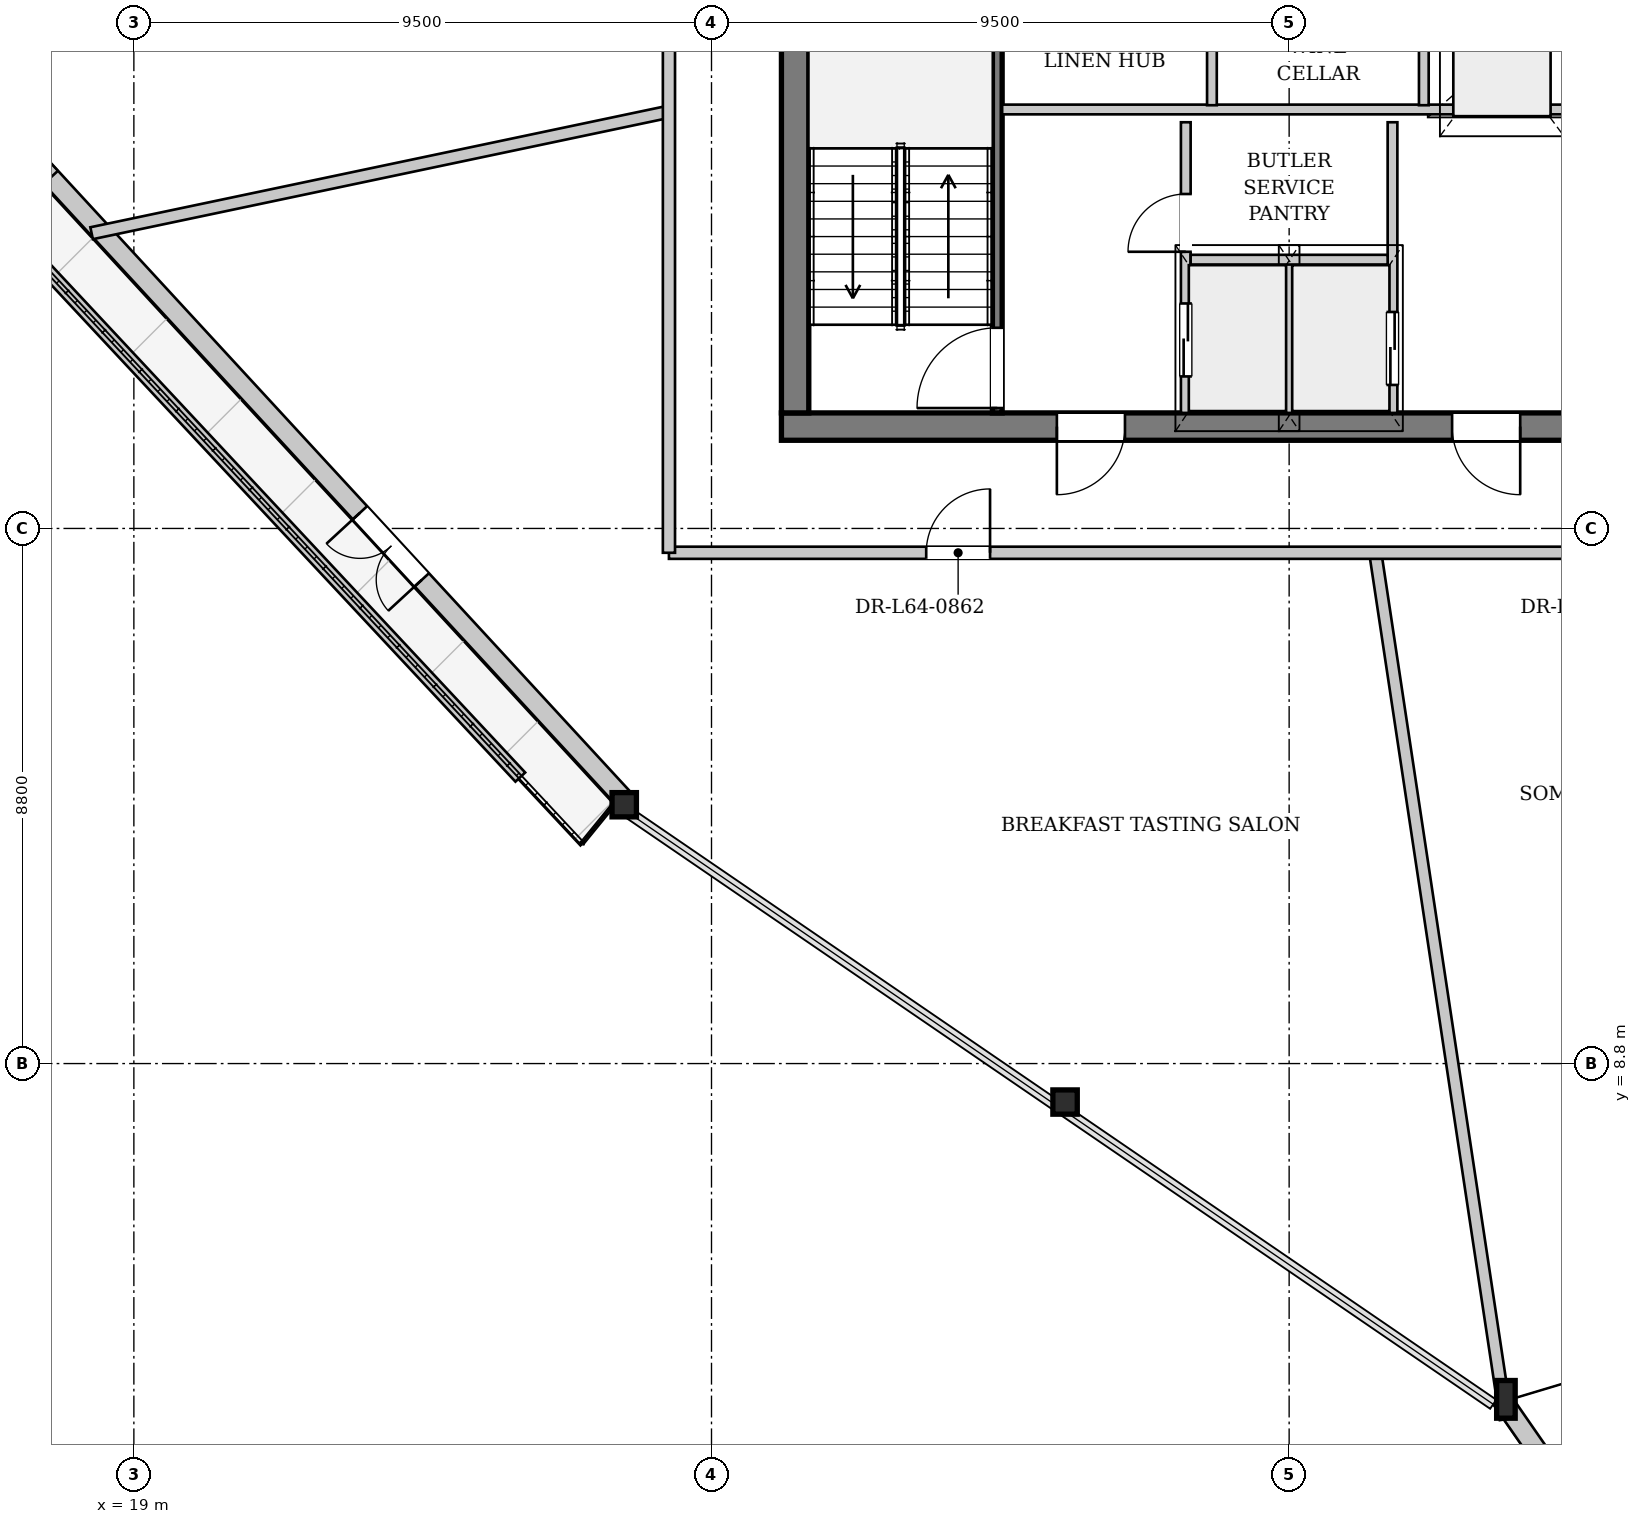
"""IFC4 building model, lengths in metres.
Left out: names, types, materials, properties, quantities, classifications, styles, units other than length and angle.
Written with IfcOpenShell. Run it as: python <this file> out.ifc"""

import sys

from ifc_helpers import new_model, si_unit, direction, frame, frame_2d, origin, origin_2d, place, context, subcontext, project, spatial, rectangle, i_section, extrude, source, transform, mapped, element, fill, save


model = new_model("IFC4")
c1 = context("Model", 3, precision=1e-05, world=origin(), true_north=direction((0.0, 1.0)))
c2 = subcontext(c1, "Body", "Model", "MODEL_VIEW")
j1 = project(units=[si_unit("LENGTHUNIT", "METRE"), si_unit("PLANEANGLEUNIT", "RADIAN")], contexts=[c1])
p1 = place(None, origin())
s1 = spatial("IfcSite", under=j1, at=p1, CompositionType="ELEMENT")
p2 = place(p1, origin())
s2 = spatial("IfcBuilding", under=s1, at=p2, CompositionType="ELEMENT")
p3 = place(p2, frame((0.0, 0.0, 241.7)))
s3 = spatial("IfcBuildingStorey", under=s2, at=p3, CompositionType="ELEMENT", Elevation=241.7)
m1 = source(origin(), c2, "Body", "SweptSolid", [
    extrude(i_section(OverallWidth=0.401, OverallDepth=0.399, WebThickness=0.022, FlangeThickness=0.034, at=origin_2d()), origin(), (0.0, 0.0, 1.0), 3.45),
])
p4 = place(p3, frame((26.906, 13.079, 0.0), z_axis=(0.09164447081, -0.01316283519, 0.99570479096), x_axis=(0.142170385525, 0.989842200292, 0.0)))
e1 = element("IfcColumn", 1, at=p4, inside=s3, PredefinedType="COLUMN", context=c2, shape_type="MappedRepresentation", body=[
    mapped(m1, transform((0.0, 0.0, 0.0), x_axis=(1.0, 0.0, 0.0), y_axis=(0.0, 1.0, 0.0), z_axis=(0.0, 0.0, 1.0), scale=1.0)),
])
m2 = source(origin(), c2, "Body", "SweptSolid", [
    extrude(i_section(OverallWidth=0.401, OverallDepth=0.399, WebThickness=0.022, FlangeThickness=0.034, at=origin_2d()), origin(), (0.0, 0.0, 1.0), 3.455),
])
p5 = place(p3, frame((34.132, 8.138, 0.0), z_axis=(0.106064205529, 0.016676317458, 0.994219434904), x_axis=(-0.155320411925, 0.987864145336, 0.0)))
e2 = element("IfcColumn", 2, at=p5, inside=s3, PredefinedType="COLUMN", context=c2, shape_type="MappedRepresentation", body=[
    mapped(m2, transform((0.0, 0.0, 0.0), x_axis=(1.0, 0.0, 0.0), y_axis=(0.0, 1.0, 0.0), z_axis=(0.0, 0.0, 1.0), scale=1.0)),
])
m3 = source(origin(), c2, "Body", "SweptSolid", [
    extrude(i_section(OverallWidth=0.305, OverallDepth=0.62, WebThickness=0.021, FlangeThickness=0.04, at=origin_2d()), origin(), (0.0, 0.0, 1.0), 3.464),
])
p6 = place(p3, frame((41.357, 3.198, 0.0), z_axis=(0.120378309465, 0.046445729472, 0.991640991904), x_axis=(-0.359967164557, 0.932964972783, 0.0)))
e3 = element("IfcColumn", 3, at=p6, inside=s3, PredefinedType="COLUMN", context=c2, shape_type="MappedRepresentation", body=[
    mapped(m3, transform((0.0, 0.0, 0.0), x_axis=(1.0, 0.0, 0.0), y_axis=(0.0, 1.0, 0.0), z_axis=(0.0, 0.0, 1.0), scale=1.0)),
])
p7 = place(p3, frame((42.896, 1.258, 0.0), z_axis=(0.0, 0.0, 1.0), x_axis=(-0.569903262384, 0.821711793467, 0.0)))
e4 = element("IfcWall", 4, at=p7, inside=s3, PredefinedType="SOLIDWALL", context=c2, shape_type="SweptSolid", body=[
    extrude(rectangle(XDim=2.471, YDim=0.32, at=frame_2d((1.236, 0.0))), origin(), (0.0, 0.0, 1.0), 2.872),
])
p8 = place(p3, frame((27.024, 13.188, 0.0), z_axis=(0.0, 0.0, 1.0), x_axis=(-0.677764411213, 0.735279132638, 0.0)))
e5 = element("IfcWall", 5, at=p8, inside=s3, PredefinedType="SOLIDWALL", context=c2, shape_type="SweptSolid", body=[
    extrude(rectangle(XDim=17.506, YDim=0.32, at=frame_2d((8.753, 0.0))), origin(), (0.0, 0.0, 1.0), 2.872),
])
p9 = place(p8, frame((4.852, 0.0, 0.0)))
e6 = element("IfcOpeningElement", 6, at=p9, cuts=e5, PredefinedType="OPENING", context=c2, shape_type="SweptSolid", body=[
    extrude(rectangle(XDim=1.5, YDim=2.3, at=frame_2d((0.75, 1.15))), frame((0.0, 0.17, 0.0), z_axis=(0.0, -1.0, 0.0), x_axis=(1.0, 0.0, 0.0)), (0.0, 0.0, 1.0), 0.34),
])
p10 = place(p8, frame((13.854, 0.0, 0.402)))
e7 = element("IfcOpeningElement", 7, at=p10, cuts=e5, PredefinedType="OPENING", context=c2, shape_type="SweptSolid", body=[
    extrude(rectangle(XDim=2.6, YDim=2.35, at=frame_2d((1.3, 1.175))), frame((0.0, 0.17, 0.0), z_axis=(0.0, -1.0, 0.0), x_axis=(1.0, 0.0, 0.0)), (0.0, 0.0, 1.0), 0.34),
])
p11 = place(p3, frame((14.681, 24.936, 0.0), z_axis=(0.0, 0.0, 1.0), x_axis=(0.682707047276, -0.730692197577, 0.0)))
e8 = element("IfcWall", 8, at=p11, inside=s3, PredefinedType="PARAPET", context=c2, shape_type="SweptSolid", body=[
    extrude(rectangle(XDim=15.635, YDim=0.22, at=frame_2d((7.817, 0.0))), origin(), (0.0, 0.0, 1.0), 0.3),
])
p12 = place(p3, frame((46.35, 19.275, 0.0), z_axis=(0.0, 0.0, 1.0), x_axis=(-1.0, 0.0, 0.0)))
e9 = element("IfcWall", 9, at=p12, inside=s3, PredefinedType="SHEAR", context=c2, shape_type="SweptSolid", body=[
    extrude(rectangle(XDim=16.7, YDim=0.45, at=frame_2d((8.35, 0.0))), origin(), (0.0, 0.0, 1.0), 3.38),
])
p13 = place(p12, frame((4.55, 0.0, 0.0)))
e10 = element("IfcOpeningElement", 10, at=p13, cuts=e9, PredefinedType="OPENING", context=c2, shape_type="SweptSolid", body=[
    extrude(rectangle(XDim=1.12, YDim=2.25, at=frame_2d((0.56, 1.125))), frame((0.0, 0.235, 0.0), z_axis=(0.0, -1.0, 0.0), x_axis=(1.0, 0.0, 0.0)), (0.0, 0.0, 1.0), 0.47),
])
p14 = place(p12, frame((11.05, 0.0, 0.0)))
e11 = element("IfcOpeningElement", 11, at=p14, cuts=e9, PredefinedType="OPENING", context=c2, shape_type="SweptSolid", body=[
    extrude(rectangle(XDim=1.12, YDim=2.25, at=frame_2d((0.56, 1.125))), frame((0.0, 0.235, 0.0), z_axis=(0.0, -1.0, 0.0), x_axis=(1.0, 0.0, 0.0)), (0.0, 0.0, 1.0), 0.47),
])
p15 = place(p3, frame((29.875, 19.5, 0.0), z_axis=(0.0, 0.0, 1.0), x_axis=(0.0, 1.0, 0.0)))
e12 = element("IfcWall", 12, at=p15, inside=s3, PredefinedType="SHEAR", context=c2, shape_type="SweptSolid", body=[
    extrude(rectangle(XDim=14.2, YDim=0.45, at=frame_2d((7.1, 0.0))), origin(), (0.0, 0.0, 1.0), 3.38),
])
p16 = place(p15, frame((7.42, 0.0, 0.0)))
e13 = element("IfcOpeningElement", 13, at=p16, cuts=e12, PredefinedType="OPENING", context=c2, shape_type="SweptSolid", body=[
    extrude(rectangle(XDim=1.6, YDim=2.2, at=frame_2d((0.8, 1.1))), frame((0.0, 0.235, 0.0), z_axis=(0.0, -1.0, 0.0), x_axis=(1.0, 0.0, 0.0)), (0.0, 0.0, 1.0), 0.47),
])
p17 = place(p3, frame((33.2, 19.5, 0.0), z_axis=(0.0, 0.0, 1.0), x_axis=(0.0, 1.0, 0.0)))
e14 = element("IfcWall", 14, at=p17, inside=s3, PredefinedType="PARTITIONING", context=c2, shape_type="SweptSolid", body=[
    extrude(rectangle(XDim=7.46, YDim=0.16, at=frame_2d((3.73, 0.0))), origin(), (0.0, 0.0, 1.0), 3.38),
])
p18 = place(p17, frame((0.08, 0.0, 0.0)))
e15 = element("IfcOpeningElement", 15, at=p18, cuts=e14, PredefinedType="OPENING", context=c2, shape_type="SweptSolid", body=[
    extrude(rectangle(XDim=1.32, YDim=2.2, at=frame_2d((0.66, 1.1))), frame((0.0, 0.09, 0.0), z_axis=(0.0, -1.0, 0.0), x_axis=(1.0, 0.0, 0.0)), (0.0, 0.0, 1.0), 0.18),
])
p19 = place(p3, frame((36.3, 19.5, 0.0), z_axis=(0.0, 0.0, 1.0), x_axis=(0.0, 1.0, 0.0)))
e16 = element("IfcWall", 16, at=p19, inside=s3, PredefinedType="PARTITIONING", context=c2, shape_type="SweptSolid", body=[
    extrude(rectangle(XDim=4.78, YDim=0.16, at=frame_2d((2.39, 0.0))), origin(), (0.0, 0.0, 1.0), 3.38),
])
p20 = place(p19, frame((0.6, 0.0, 0.0)))
e17 = element("IfcOpeningElement", 17, at=p20, cuts=e16, PredefinedType="OPENING", context=c2, shape_type="SweptSolid", body=[
    extrude(rectangle(XDim=1.2, YDim=2.2, at=frame_2d((0.6, 1.1))), frame((0.0, 0.09, 0.0), z_axis=(0.0, -1.0, 0.0), x_axis=(1.0, 0.0, 0.0)), (0.0, 0.0, 1.0), 0.18),
])
p21 = place(p19, frame((2.65, 0.0, 0.0)))
e18 = element("IfcOpeningElement", 18, at=p21, cuts=e16, PredefinedType="OPENING", context=c2, shape_type="SweptSolid", body=[
    extrude(rectangle(XDim=0.95, YDim=2.1, at=frame_2d((0.475, 1.05))), frame((0.0, 0.09, 0.0), z_axis=(0.0, -1.0, 0.0), x_axis=(1.0, 0.0, 0.0)), (0.0, 0.0, 1.0), 0.18),
])
p22 = place(p3, frame((39.7, 24.28, 0.0), z_axis=(0.0, 0.0, 1.0), x_axis=(0.0, -1.0, 0.0)))
e19 = element("IfcWall", 19, at=p22, inside=s3, PredefinedType="PARTITIONING", context=c2, shape_type="SweptSolid", body=[
    extrude(rectangle(XDim=4.78, YDim=0.16, at=frame_2d((2.39, 0.0))), origin(), (0.0, 0.0, 1.0), 3.38),
])
p23 = place(p22, frame((3.12, 0.0, 0.0)))
e20 = element("IfcOpeningElement", 20, at=p23, cuts=e19, PredefinedType="OPENING", context=c2, shape_type="SweptSolid", body=[
    extrude(rectangle(XDim=1.2, YDim=2.2, at=frame_2d((0.6, 1.1))), frame((0.0, 0.09, 0.0), z_axis=(0.0, -1.0, 0.0), x_axis=(1.0, 0.0, 0.0)), (0.0, 0.0, 1.0), 0.18),
])
p24 = place(p3, frame((38.0, 19.5, 0.0), z_axis=(0.0, 0.0, 1.0), x_axis=(0.0, 1.0, 0.0)))
e21 = element("IfcWall", 21, at=p24, inside=s3, PredefinedType="PARTITIONING", context=c2, shape_type="SweptSolid", body=[
    extrude(rectangle(XDim=2.46, YDim=0.125, at=frame_2d((1.23, 0.0))), origin(), (0.0, 0.0, 1.0), 3.38),
])
p25 = place(p3, frame((36.38, 22.02, 0.0), z_axis=(0.0, 0.0, 1.0), x_axis=(1.0, 0.0, 0.0)))
e22 = element("IfcWall", 22, at=p25, inside=s3, PredefinedType="PARTITIONING", context=c2, shape_type="SweptSolid", body=[
    extrude(rectangle(XDim=3.24, YDim=0.16, at=frame_2d((1.62, 0.0))), origin(), (0.0, 0.0, 1.0), 3.38),
])
p26 = place(p3, frame((33.28, 24.49, 0.0), z_axis=(0.0, 0.0, 1.0), x_axis=(1.0, 0.0, 0.0)))
e23 = element("IfcWall", 23, at=p26, inside=s3, PredefinedType="PARTITIONING", context=c2, shape_type="SweptSolid", body=[
    extrude(rectangle(XDim=9.44, YDim=0.16, at=frame_2d((4.72, 0.0))), origin(), (0.0, 0.0, 1.0), 3.38),
])
for number, where, z_axis, x_axis in (
    (24, (36.73, 24.56, 0.0), (0.0, 0.0, 1.0), (0.0, 1.0, 0.0)),
    (25, (40.215, 24.56, 0.0), (0.0, 0.0, 1.0), (0.0, 1.0, 0.0)),
):
    element("IfcWall", number, at=place(p3, frame(where, z_axis=z_axis, x_axis=x_axis)), inside=s3, PredefinedType="PARTITIONING", context=c2, shape_type="SweptSolid", body=[
        extrude(rectangle(XDim=2.31, YDim=0.16, at=frame_2d((1.155, 0.0))), origin(), (0.0, 0.0, 1.0), 3.38),
    ])
p27 = place(p3, frame((27.8, 24.453, 0.0), z_axis=(0.0, 0.0, 1.0), x_axis=(-0.978564998711, -0.205938202619, 0.0)))
e26 = element("IfcWall", 26, at=p27, inside=s3, PredefinedType="PARTITIONING", context=c2, shape_type="SweptSolid", body=[
    extrude(rectangle(XDim=9.703, YDim=0.2, at=frame_2d((4.852, 0.0))), origin(), (0.0, 0.0, 1.0), 3.38),
])
p28 = place(p3, frame((39.417, 17.2, 0.0), z_axis=(0.0, 0.0, 1.0), x_axis=(0.149026402879, -0.988833217102, 0.0)))
e27 = element("IfcWall", 27, at=p28, inside=s3, PredefinedType="PARTITIONING", context=c2, shape_type="SweptSolid", body=[
    extrude(rectangle(XDim=14.41, YDim=0.2, at=frame_2d((7.205, 0.0))), origin(), (0.0, 0.0, 1.0), 3.38),
])
p29 = place(p3, frame((27.8, 17.2, 0.0), z_axis=(0.0, 0.0, 1.0), x_axis=(1.0, 0.0, 0.0)))
e28 = element("IfcWall", 28, at=p29, inside=s3, PredefinedType="PARTITIONING", context=c2, shape_type="SweptSolid", body=[
    extrude(rectangle(XDim=20.4, YDim=0.2, at=frame_2d((10.2, 0.0))), origin(), (0.0, 0.0, 1.0), 3.38),
])
p30 = place(p29, frame((4.231, 0.0, 0.0)))
e29 = element("IfcOpeningElement", 29, at=p30, cuts=e28, PredefinedType="OPENING", context=c2, shape_type="SweptSolid", body=[
    extrude(rectangle(XDim=1.05, YDim=2.2, at=frame_2d((0.525, 1.1))), frame((0.0, 0.11, 0.0), z_axis=(0.0, -1.0, 0.0), x_axis=(1.0, 0.0, 0.0)), (0.0, 0.0, 1.0), 0.22),
])
p31 = place(p29, frame((15.174, 0.0, 0.0)))
e30 = element("IfcOpeningElement", 30, at=p31, cuts=e28, PredefinedType="OPENING", context=c2, shape_type="SweptSolid", body=[
    extrude(rectangle(XDim=1.05, YDim=2.2, at=frame_2d((0.525, 1.1))), frame((0.0, 0.11, 0.0), z_axis=(0.0, -1.0, 0.0), x_axis=(1.0, 0.0, 0.0)), (0.0, 0.0, 1.0), 0.22),
])
p32 = place(p3, frame((27.8, 17.2, 0.0), z_axis=(0.0, 0.0, 1.0), x_axis=(0.0, 1.0, 0.0)))
e31 = element("IfcWall", 31, at=p32, inside=s3, PredefinedType="PARTITIONING", context=c2, shape_type="SweptSolid", body=[
    extrude(rectangle(XDim=18.8, YDim=0.2, at=frame_2d((9.4, 0.0))), origin(), (0.0, 0.0, 1.0), 3.38),
])
m4 = source(origin(), c2, "Body", "SweptSolid", [
    extrude(rectangle(XDim=1.5, YDim=2.3, at=frame_2d((0.75, 1.15))), frame((0.0, 0.025, 0.0), z_axis=(0.0, -1.0, 0.0), x_axis=(1.0, 0.0, 0.0)), (0.0, 0.0, 1.0), 0.05),
])
p33 = place(p9, origin())
e32 = element("IfcDoor", 32, at=p33, inside=s3, OperationType="DOUBLE_DOOR_SINGLE_SWING", PredefinedType="DOOR", context=c2, shape_type="MappedRepresentation", body=[
    mapped(m4, transform((0.0, 0.0, 0.0), x_axis=(1.0, 0.0, 0.0), y_axis=(0.0, 1.0, 0.0), z_axis=(0.0, 0.0, 1.0), scale=1.0)),
])
fill(e6, e32)
m5 = source(origin(), c2, "Body", "SweptSolid", [
    extrude(rectangle(XDim=1.12, YDim=2.25, at=frame_2d((0.56, 1.125))), frame((0.0, 0.025, 0.0), z_axis=(0.0, -1.0, 0.0), x_axis=(1.0, 0.0, 0.0)), (0.0, 0.0, 1.0), 0.05),
])
p34 = place(p13, origin())
e33 = element("IfcDoor", 33, at=p34, inside=s3, OperationType="SINGLE_SWING_LEFT", PredefinedType="DOOR", context=c2, shape_type="MappedRepresentation", body=[
    mapped(m5, transform((0.0, 0.0, 0.0), x_axis=(1.0, 0.0, 0.0), y_axis=(0.0, 1.0, 0.0), z_axis=(0.0, 0.0, 1.0), scale=1.0)),
])
fill(e10, e33)
p35 = place(p14, origin())
e34 = element("IfcDoor", 34, at=p35, inside=s3, OperationType="SINGLE_SWING_RIGHT", PredefinedType="DOOR", context=c2, shape_type="MappedRepresentation", body=[
    mapped(m5, transform((0.0, 0.0, 0.0), x_axis=(1.0, 0.0, 0.0), y_axis=(0.0, 1.0, 0.0), z_axis=(0.0, 0.0, 1.0), scale=1.0)),
])
fill(e11, e34)
m6 = source(origin(), c2, "Body", "SweptSolid", [
    extrude(rectangle(XDim=1.32, YDim=2.2, at=frame_2d((0.66, 1.1))), frame((0.0, 0.025, 0.0), z_axis=(0.0, -1.0, 0.0), x_axis=(1.0, 0.0, 0.0)), (0.0, 0.0, 1.0), 0.05),
])
p36 = place(p18, origin())
e35 = element("IfcDoor", 35, at=p36, inside=s3, OperationType="SINGLE_SWING_LEFT", PredefinedType="DOOR", context=c2, shape_type="MappedRepresentation", body=[
    mapped(m6, transform((0.0, 0.0, 0.0), x_axis=(1.0, 0.0, 0.0), y_axis=(0.0, 1.0, 0.0), z_axis=(0.0, 0.0, 1.0), scale=1.0)),
])
fill(e15, e35)
m7 = source(origin(), c2, "Body", "SweptSolid", [
    extrude(rectangle(XDim=1.2, YDim=2.2, at=frame_2d((0.6, 1.1))), frame((0.0, 0.025, 0.0), z_axis=(0.0, -1.0, 0.0), x_axis=(1.0, 0.0, 0.0)), (0.0, 0.0, 1.0), 0.05),
])
p37 = place(p20, origin())
e36 = element("IfcDoor", 36, at=p37, inside=s3, OperationType="DOUBLE_DOOR_SLIDING", PredefinedType="DOOR", context=c2, shape_type="MappedRepresentation", body=[
    mapped(m7, transform((0.0, 0.0, 0.0), x_axis=(1.0, 0.0, 0.0), y_axis=(0.0, 1.0, 0.0), z_axis=(0.0, 0.0, 1.0), scale=1.0)),
])
fill(e17, e36)
m8 = source(origin(), c2, "Body", "SweptSolid", [
    extrude(rectangle(XDim=0.95, YDim=2.1, at=frame_2d((0.475, 1.05))), frame((0.0, 0.025, 0.0), z_axis=(0.0, -1.0, 0.0), x_axis=(1.0, 0.0, 0.0)), (0.0, 0.0, 1.0), 0.05),
])
p38 = place(p21, origin())
e37 = element("IfcDoor", 37, at=p38, inside=s3, OperationType="SINGLE_SWING_LEFT", PredefinedType="DOOR", context=c2, shape_type="MappedRepresentation", body=[
    mapped(m8, transform((0.0, 0.0, 0.0), x_axis=(1.0, 0.0, 0.0), y_axis=(0.0, 1.0, 0.0), z_axis=(0.0, 0.0, 1.0), scale=1.0)),
])
fill(e18, e37)
p39 = place(p23, origin())
e38 = element("IfcDoor", 38, at=p39, inside=s3, OperationType="DOUBLE_DOOR_SLIDING", PredefinedType="DOOR", context=c2, shape_type="MappedRepresentation", body=[
    mapped(m7, transform((0.0, 0.0, 0.0), x_axis=(1.0, 0.0, 0.0), y_axis=(0.0, 1.0, 0.0), z_axis=(0.0, 0.0, 1.0), scale=1.0)),
])
fill(e20, e38)
m9 = source(origin(), c2, "Body", "SweptSolid", [
    extrude(rectangle(XDim=1.05, YDim=2.2, at=frame_2d((0.525, 1.1))), frame((0.0, 0.025, 0.0), z_axis=(0.0, -1.0, 0.0), x_axis=(1.0, 0.0, 0.0)), (0.0, 0.0, 1.0), 0.05),
])
p40 = place(p30, origin())
e39 = element("IfcDoor", 39, at=p40, inside=s3, OperationType="SINGLE_SWING_RIGHT", PredefinedType="DOOR", context=c2, shape_type="MappedRepresentation", body=[
    mapped(m9, transform((0.0, 0.0, 0.0), x_axis=(1.0, 0.0, 0.0), y_axis=(0.0, 1.0, 0.0), z_axis=(0.0, 0.0, 1.0), scale=1.0)),
])
fill(e29, e39)
save(model, sys.argv[1])
